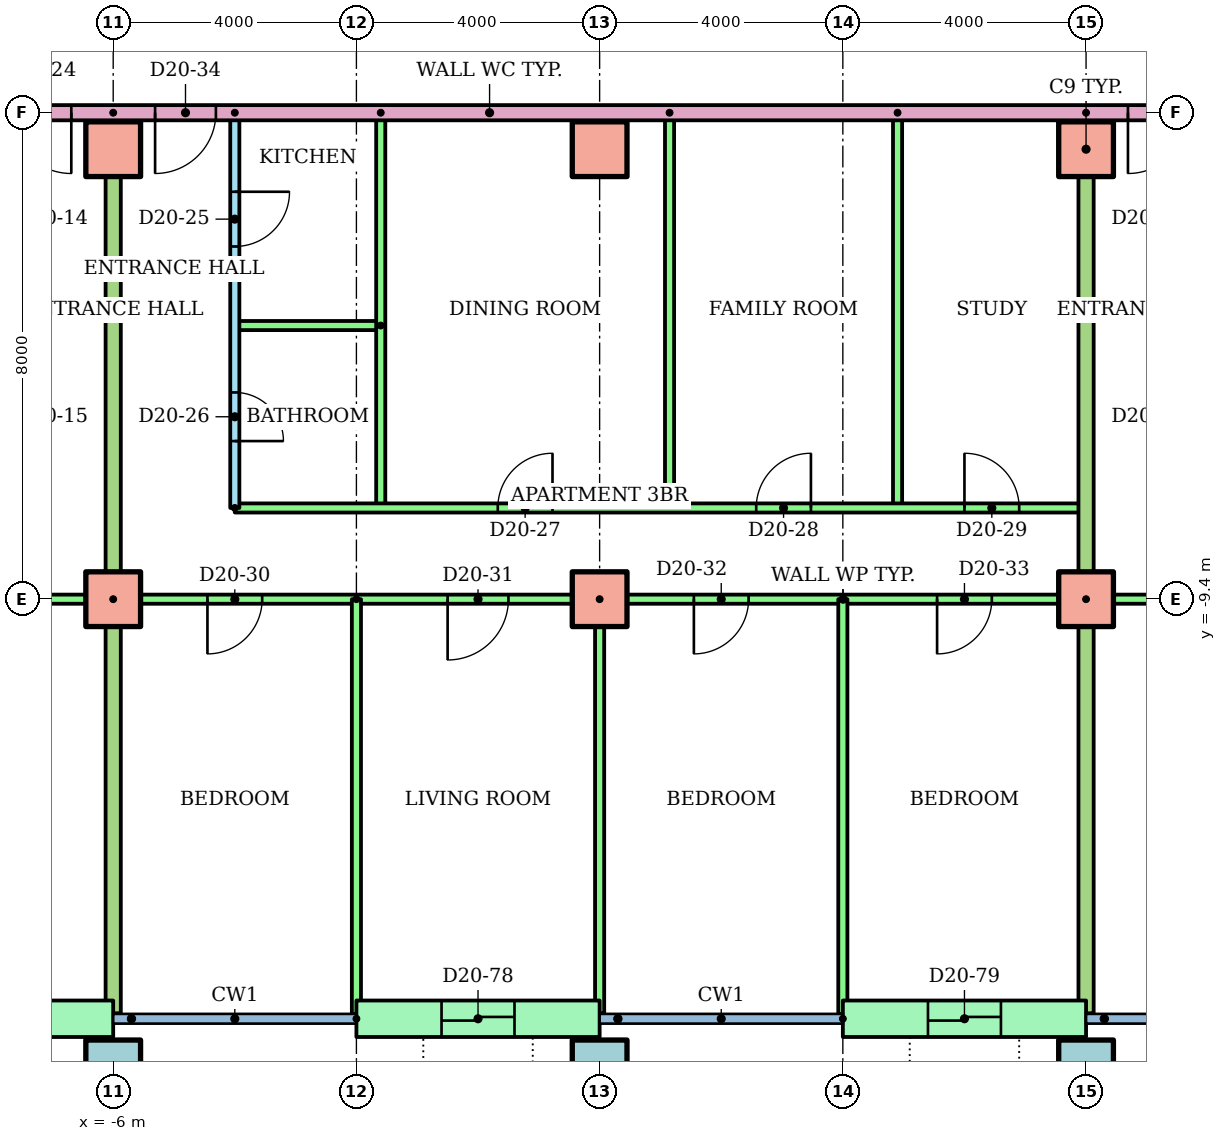
"""IFC4 building model, lengths in metres.
Left out: names, types, materials, properties, quantities, classifications, styles, units other than length and angle.
Written with IfcOpenShell. Run it as: python <this file> out.ifc"""

import sys

from ifc_helpers import new_model, si_unit, direction, frame, frame_2d, origin, origin_2d, place, context, subcontext, project, spatial, rectangle, hollow_rectangle, extrude, element, fill, save


model = new_model("IFC4")
c1 = context("Model", 3, precision=1e-05, world=origin(), true_north=direction((0.0, 1.0)))
c2 = subcontext(c1, "Body", "Model", "MODEL_VIEW")
j1 = project(units=[si_unit("LENGTHUNIT", "METRE"), si_unit("PLANEANGLEUNIT", "RADIAN")], contexts=[c1])
p1 = place(None, origin())
s1 = spatial("IfcSite", under=j1, at=p1, CompositionType="ELEMENT")
p2 = place(p1, origin())
s2 = spatial("IfcBuilding", under=s1, at=p2, CompositionType="ELEMENT")
p3 = place(p2, frame((0.0, 0.0, 80.7)))
s3 = spatial("IfcBuildingStorey", under=s2, at=p3, CompositionType="ELEMENT", Elevation=80.7)
for number, where in (
    (1, (-6.0, -17.1, 0.0)),
    (2, (2.0, -17.1, 0.0)),
    (3, (10.0, -17.1, 0.0)),
):
    element("IfcColumn", number, at=place(p3, frame(where)), inside=s3, PredefinedType="COLUMN", context=c2, shape_type="SweptSolid", body=[
        extrude(hollow_rectangle(XDim=0.9, YDim=0.9, WallThickness=0.045, at=origin_2d()), origin(), (0.0, 0.0, 1.0), 3.2),
    ])
for number, where in (
    (4, (-6.0, -9.4, 0.0)),
    (5, (2.0, -9.4, 0.0)),
    (6, (10.0, -9.4, 0.0)),
    (7, (-6.0, -2.0, 0.0)),
    (8, (2.0, -2.0, 0.0)),
    (9, (10.0, -2.0, 0.0)),
):
    element("IfcColumn", number, at=place(p3, frame(where)), inside=s3, PredefinedType="COLUMN", context=c2, shape_type="SweptSolid", body=[
        extrude(rectangle(XDim=0.9, YDim=0.9, at=origin_2d()), origin(), (0.0, 0.0, 1.0), 3.2),
    ])
p4 = place(p3, frame((-10.0, -16.3, 0.0)))
e10 = element("IfcWall", 10, at=p4, inside=s3, PredefinedType="STANDARD", context=c2, shape_type="SweptSolid", body=[
    extrude(rectangle(XDim=4.0, YDim=0.6, at=frame_2d((2.0, 0.0))), origin(), (0.0, 0.0, 1.0), 2.92),
])
p5 = place(p4, frame((1.4, 0.0, 0.0)))
e11 = element("IfcOpeningElement", 11, at=p5, cuts=e10, PredefinedType="OPENING", context=c2, shape_type="SweptSolid", body=[
    extrude(rectangle(XDim=1.2, YDim=2.1, at=frame_2d((0.6, 1.05))), frame((0.0, 0.31, 0.0), z_axis=(0.0, -1.0, 0.0), x_axis=(1.0, 0.0, 0.0)), (0.0, 0.0, 1.0), 0.62),
])
p6 = place(p3, frame((-2.0, -16.3, 0.0)))
e12 = element("IfcWall", 12, at=p6, inside=s3, PredefinedType="STANDARD", context=c2, shape_type="SweptSolid", body=[
    extrude(rectangle(XDim=4.0, YDim=0.6, at=frame_2d((2.0, 0.0))), origin(), (0.0, 0.0, 1.0), 2.92),
])
p7 = place(p6, frame((1.4, 0.0, 0.0)))
e13 = element("IfcOpeningElement", 13, at=p7, cuts=e12, PredefinedType="OPENING", context=c2, shape_type="SweptSolid", body=[
    extrude(rectangle(XDim=1.2, YDim=2.1, at=frame_2d((0.6, 1.05))), frame((0.0, 0.31, 0.0), z_axis=(0.0, -1.0, 0.0), x_axis=(1.0, 0.0, 0.0)), (0.0, 0.0, 1.0), 0.62),
])
p8 = place(p3, frame((6.0, -16.3, 0.0)))
e14 = element("IfcWall", 14, at=p8, inside=s3, PredefinedType="STANDARD", context=c2, shape_type="SweptSolid", body=[
    extrude(rectangle(XDim=4.0, YDim=0.6, at=frame_2d((2.0, 0.0))), origin(), (0.0, 0.0, 1.0), 2.92),
])
p9 = place(p8, frame((1.4, 0.0, 0.0)))
e15 = element("IfcOpeningElement", 15, at=p9, cuts=e14, PredefinedType="OPENING", context=c2, shape_type="SweptSolid", body=[
    extrude(rectangle(XDim=1.2, YDim=2.1, at=frame_2d((0.6, 1.05))), frame((0.0, 0.31, 0.0), z_axis=(0.0, -1.0, 0.0), x_axis=(1.0, 0.0, 0.0)), (0.0, 0.0, 1.0), 0.62),
])
p10 = place(p3, frame((-6.0, -9.4, 0.0), z_axis=(0.0, 0.0, 1.0), x_axis=(-1.0, 0.0, 0.0)))
e16 = element("IfcWall", 16, at=p10, inside=s3, PredefinedType="PARTITIONING", context=c2, shape_type="SweptSolid", body=[
    extrude(rectangle(XDim=22.61, YDim=0.15, at=frame_2d((11.305, 0.0))), origin(), (0.0, 0.0, 1.0), 2.4),
])
p11 = place(p10, frame((19.7, 0.0, 0.0)))
e17 = element("IfcOpeningElement", 17, at=p11, cuts=e16, PredefinedType="OPENING", context=c2, shape_type="SweptSolid", body=[
    extrude(rectangle(XDim=0.9, YDim=2.1, at=frame_2d((0.45, 1.05))), frame((0.0, 0.085, 0.0), z_axis=(0.0, -1.0, 0.0), x_axis=(1.0, 0.0, 0.0)), (0.0, 0.0, 1.0), 0.17),
])
p12 = place(p10, frame((14.411, 0.0, 0.0)))
e18 = element("IfcOpeningElement", 18, at=p12, cuts=e16, PredefinedType="OPENING", context=c2, shape_type="SweptSolid", body=[
    extrude(rectangle(XDim=0.9, YDim=2.1, at=frame_2d((0.45, 1.05))), frame((0.0, 0.085, 0.0), z_axis=(0.0, -1.0, 0.0), x_axis=(1.0, 0.0, 0.0)), (0.0, 0.0, 1.0), 0.17),
])
p13 = place(p10, frame((9.5, 0.0, 0.0)))
e19 = element("IfcOpeningElement", 19, at=p13, cuts=e16, PredefinedType="OPENING", context=c2, shape_type="SweptSolid", body=[
    extrude(rectangle(XDim=1.0, YDim=2.1, at=frame_2d((0.5, 1.05))), frame((0.0, 0.085, 0.0), z_axis=(0.0, -1.0, 0.0), x_axis=(1.0, 0.0, 0.0)), (0.0, 0.0, 1.0), 0.17),
])
p14 = place(p10, frame((5.55, 0.0, 0.0)))
e20 = element("IfcOpeningElement", 20, at=p14, cuts=e16, PredefinedType="OPENING", context=c2, shape_type="SweptSolid", body=[
    extrude(rectangle(XDim=0.9, YDim=2.1, at=frame_2d((0.45, 1.05))), frame((0.0, 0.085, 0.0), z_axis=(0.0, -1.0, 0.0), x_axis=(1.0, 0.0, 0.0)), (0.0, 0.0, 1.0), 0.17),
])
p15 = place(p10, frame((1.55, 0.0, 0.0)))
e21 = element("IfcOpeningElement", 21, at=p15, cuts=e16, PredefinedType="OPENING", context=c2, shape_type="SweptSolid", body=[
    extrude(rectangle(XDim=0.9, YDim=2.1, at=frame_2d((0.45, 1.05))), frame((0.0, 0.085, 0.0), z_axis=(0.0, -1.0, 0.0), x_axis=(1.0, 0.0, 0.0)), (0.0, 0.0, 1.0), 0.17),
])
p16 = place(p3, frame((-4.0, -1.4, 0.0), z_axis=(0.0, 0.0, 1.0), x_axis=(0.0, -1.0, 0.0)))
e22 = element("IfcWall", 22, at=p16, inside=s3, PredefinedType="PARTITIONING", context=c2, shape_type="SweptSolid", body=[
    extrude(rectangle(XDim=6.5, YDim=0.15, at=frame_2d((3.25, 0.0))), origin(), (0.0, 0.0, 1.0), 2.4),
])
p17 = place(p16, frame((1.3, 0.0, 0.0)))
e23 = element("IfcOpeningElement", 23, at=p17, cuts=e22, PredefinedType="OPENING", context=c2, shape_type="SweptSolid", body=[
    extrude(rectangle(XDim=0.9, YDim=2.1, at=frame_2d((0.45, 1.05))), frame((0.0, 0.085, 0.0), z_axis=(0.0, -1.0, 0.0), x_axis=(1.0, 0.0, 0.0)), (0.0, 0.0, 1.0), 0.17),
])
p18 = place(p16, frame((4.6, 0.0, 0.0)))
e24 = element("IfcOpeningElement", 24, at=p18, cuts=e22, PredefinedType="OPENING", context=c2, shape_type="SweptSolid", body=[
    extrude(rectangle(XDim=0.8, YDim=2.1, at=frame_2d((0.4, 1.05))), frame((0.0, 0.085, 0.0), z_axis=(0.0, -1.0, 0.0), x_axis=(1.0, 0.0, 0.0)), (0.0, 0.0, 1.0), 0.17),
])
p19 = place(p3, frame((-1.6, -4.9, 0.0), z_axis=(0.0, 0.0, 1.0), x_axis=(-1.0, 0.0, 0.0)))
e25 = element("IfcWall", 25, at=p19, inside=s3, PredefinedType="PARTITIONING", context=c2, shape_type="SweptSolid", body=[
    extrude(rectangle(XDim=2.4, YDim=0.15, at=frame_2d((1.2, 0.0))), origin(), (0.0, 0.0, 1.0), 2.4),
])
for number, where, z_axis, x_axis in (
    (26, (-1.6, -1.4, 0.0), (0.0, 0.0, 1.0), (0.0, -1.0, 0.0)),
    (27, (3.15, -1.4, 0.0), (0.0, 0.0, 1.0), (0.0, -1.0, 0.0)),
    (28, (6.9, -1.4, 0.0), (0.0, 0.0, 1.0), (0.0, -1.0, 0.0)),
):
    element("IfcWall", number, at=place(p3, frame(where, z_axis=z_axis, x_axis=x_axis)), inside=s3, PredefinedType="PARTITIONING", context=c2, shape_type="SweptSolid", body=[
        extrude(rectangle(XDim=6.5, YDim=0.15, at=frame_2d((3.25, 0.0))), origin(), (0.0, 0.0, 1.0), 2.4),
    ])
p20 = place(p3, frame((-4.0, -7.9, 0.0)))
e29 = element("IfcWall", 29, at=p20, inside=s3, PredefinedType="PARTITIONING", context=c2, shape_type="SweptSolid", body=[
    extrude(rectangle(XDim=14.0, YDim=0.15, at=frame_2d((7.0, 0.0))), origin(), (0.0, 0.0, 1.0), 2.4),
])
p21 = place(p20, frame((4.325, 0.0, 0.0)))
e30 = element("IfcOpeningElement", 30, at=p21, cuts=e29, PredefinedType="OPENING", context=c2, shape_type="SweptSolid", body=[
    extrude(rectangle(XDim=0.9, YDim=2.1, at=frame_2d((0.45, 1.05))), frame((0.0, 0.085, 0.0), z_axis=(0.0, -1.0, 0.0), x_axis=(1.0, 0.0, 0.0)), (0.0, 0.0, 1.0), 0.17),
])
p22 = place(p20, frame((8.575, 0.0, 0.0)))
e31 = element("IfcOpeningElement", 31, at=p22, cuts=e29, PredefinedType="OPENING", context=c2, shape_type="SweptSolid", body=[
    extrude(rectangle(XDim=0.9, YDim=2.1, at=frame_2d((0.45, 1.05))), frame((0.0, 0.085, 0.0), z_axis=(0.0, -1.0, 0.0), x_axis=(1.0, 0.0, 0.0)), (0.0, 0.0, 1.0), 0.17),
])
p23 = place(p20, frame((12.0, 0.0, 0.0)))
e32 = element("IfcOpeningElement", 32, at=p23, cuts=e29, PredefinedType="OPENING", context=c2, shape_type="SweptSolid", body=[
    extrude(rectangle(XDim=0.9, YDim=2.1, at=frame_2d((0.45, 1.05))), frame((0.0, 0.085, 0.0), z_axis=(0.0, -1.0, 0.0), x_axis=(1.0, 0.0, 0.0)), (0.0, 0.0, 1.0), 0.17),
])
p24 = place(p3, frame((10.0, -9.4, 0.0), z_axis=(0.0, 0.0, 1.0), x_axis=(-1.0, 0.0, 0.0)))
e33 = element("IfcWall", 33, at=p24, inside=s3, PredefinedType="PARTITIONING", context=c2, shape_type="SweptSolid", body=[
    extrude(rectangle(XDim=16.0, YDim=0.15, at=frame_2d((8.0, 0.0))), origin(), (0.0, 0.0, 1.0), 2.4),
])
p25 = place(p24, frame((13.55, 0.0, 0.0)))
e34 = element("IfcOpeningElement", 34, at=p25, cuts=e33, PredefinedType="OPENING", context=c2, shape_type="SweptSolid", body=[
    extrude(rectangle(XDim=0.9, YDim=2.1, at=frame_2d((0.45, 1.05))), frame((0.0, 0.085, 0.0), z_axis=(0.0, -1.0, 0.0), x_axis=(1.0, 0.0, 0.0)), (0.0, 0.0, 1.0), 0.17),
])
p26 = place(p24, frame((9.5, 0.0, 0.0)))
e35 = element("IfcOpeningElement", 35, at=p26, cuts=e33, PredefinedType="OPENING", context=c2, shape_type="SweptSolid", body=[
    extrude(rectangle(XDim=1.0, YDim=2.1, at=frame_2d((0.5, 1.05))), frame((0.0, 0.085, 0.0), z_axis=(0.0, -1.0, 0.0), x_axis=(1.0, 0.0, 0.0)), (0.0, 0.0, 1.0), 0.17),
])
p27 = place(p24, frame((5.55, 0.0, 0.0)))
e36 = element("IfcOpeningElement", 36, at=p27, cuts=e33, PredefinedType="OPENING", context=c2, shape_type="SweptSolid", body=[
    extrude(rectangle(XDim=0.9, YDim=2.1, at=frame_2d((0.45, 1.05))), frame((0.0, 0.085, 0.0), z_axis=(0.0, -1.0, 0.0), x_axis=(1.0, 0.0, 0.0)), (0.0, 0.0, 1.0), 0.17),
])
p28 = place(p24, frame((1.55, 0.0, 0.0)))
e37 = element("IfcOpeningElement", 37, at=p28, cuts=e33, PredefinedType="OPENING", context=c2, shape_type="SweptSolid", body=[
    extrude(rectangle(XDim=0.9, YDim=2.1, at=frame_2d((0.45, 1.05))), frame((0.0, 0.085, 0.0), z_axis=(0.0, -1.0, 0.0), x_axis=(1.0, 0.0, 0.0)), (0.0, 0.0, 1.0), 0.17),
])
p29 = place(p3, frame((-2.0, -9.4, 0.0), z_axis=(0.0, 0.0, 1.0), x_axis=(0.0, -1.0, 0.0)))
e38 = element("IfcWall", 38, at=p29, inside=s3, PredefinedType="PARTITIONING", context=c2, shape_type="SweptSolid", body=[
    extrude(rectangle(XDim=6.821, YDim=0.15, at=frame_2d((3.411, 0.0))), origin(), (0.0, 0.0, 1.0), 2.4),
])
p30 = place(p3, frame((2.0, -9.4, 0.0), z_axis=(0.0, 0.0, 1.0), x_axis=(0.0, -1.0, 0.0)))
e39 = element("IfcWall", 39, at=p30, inside=s3, PredefinedType="PARTITIONING", context=c2, shape_type="SweptSolid", body=[
    extrude(rectangle(XDim=6.81, YDim=0.15, at=frame_2d((3.405, 0.0))), origin(), (0.0, 0.0, 1.0), 2.4),
])
p31 = place(p3, frame((6.0, -9.4, 0.0), z_axis=(0.0, 0.0, 1.0), x_axis=(0.0, -1.0, 0.0)))
e40 = element("IfcWall", 40, at=p31, inside=s3, PredefinedType="PARTITIONING", context=c2, shape_type="SweptSolid", body=[
    extrude(rectangle(XDim=6.821, YDim=0.15, at=frame_2d((3.411, 0.0))), origin(), (0.0, 0.0, 1.0), 2.4),
])
p32 = place(p3, frame((-6.0, -1.4, 0.0), z_axis=(0.0, 0.0, 1.0), x_axis=(0.0, -1.0, 0.0)))
e41 = element("IfcWall", 41, at=p32, inside=s3, PredefinedType="PARTITIONING", context=c2, shape_type="SweptSolid", body=[
    extrude(rectangle(XDim=14.81, YDim=0.25, at=frame_2d((7.405, 0.0))), origin(), (0.0, 0.0, 1.0), 2.4),
])
p33 = place(p3, frame((26.0, -9.4, 0.0), z_axis=(0.0, 0.0, 1.0), x_axis=(-1.0, 0.0, 0.0)))
e42 = element("IfcWall", 42, at=p33, inside=s3, PredefinedType="PARTITIONING", context=c2, shape_type="SweptSolid", body=[
    extrude(rectangle(XDim=16.0, YDim=0.15, at=frame_2d((8.0, 0.0))), origin(), (0.0, 0.0, 1.0), 2.4),
])
p34 = place(p33, frame((13.55, 0.0, 0.0)))
e43 = element("IfcOpeningElement", 43, at=p34, cuts=e42, PredefinedType="OPENING", context=c2, shape_type="SweptSolid", body=[
    extrude(rectangle(XDim=0.9, YDim=2.1, at=frame_2d((0.45, 1.05))), frame((0.0, 0.085, 0.0), z_axis=(0.0, -1.0, 0.0), x_axis=(1.0, 0.0, 0.0)), (0.0, 0.0, 1.0), 0.17),
])
p35 = place(p33, frame((9.55, 0.0, 0.0)))
e44 = element("IfcOpeningElement", 44, at=p35, cuts=e42, PredefinedType="OPENING", context=c2, shape_type="SweptSolid", body=[
    extrude(rectangle(XDim=0.9, YDim=2.1, at=frame_2d((0.45, 1.05))), frame((0.0, 0.085, 0.0), z_axis=(0.0, -1.0, 0.0), x_axis=(1.0, 0.0, 0.0)), (0.0, 0.0, 1.0), 0.17),
])
p36 = place(p33, frame((3.5, 0.0, 0.0)))
e45 = element("IfcOpeningElement", 45, at=p36, cuts=e42, PredefinedType="OPENING", context=c2, shape_type="SweptSolid", body=[
    extrude(rectangle(XDim=1.0, YDim=2.1, at=frame_2d((0.5, 1.05))), frame((0.0, 0.085, 0.0), z_axis=(0.0, -1.0, 0.0), x_axis=(1.0, 0.0, 0.0)), (0.0, 0.0, 1.0), 0.17),
])
p37 = place(p3, frame((10.0, -1.4, 0.0), z_axis=(0.0, 0.0, 1.0), x_axis=(0.0, -1.0, 0.0)))
e46 = element("IfcWall", 46, at=p37, inside=s3, PredefinedType="PARTITIONING", context=c2, shape_type="SweptSolid", body=[
    extrude(rectangle(XDim=14.81, YDim=0.25, at=frame_2d((7.405, 0.0))), origin(), (0.0, 0.0, 1.0), 2.4),
])
p38 = place(p3, frame((14.0, -1.4, 0.0), z_axis=(0.0, 0.0, 1.0), x_axis=(-1.0, 0.0, 0.0)))
e47 = element("IfcWall", 47, at=p38, inside=s3, PredefinedType="PARTITIONING", context=c2, shape_type="SweptSolid", body=[
    extrude(rectangle(XDim=28.0, YDim=0.25, at=frame_2d((14.0, 0.0))), origin(), (0.0, 0.0, 1.0), 2.4),
])
p39 = place(p38, frame((20.689, 0.0, 0.0)))
e48 = element("IfcOpeningElement", 48, at=p39, cuts=e47, PredefinedType="OPENING", context=c2, shape_type="SweptSolid", body=[
    extrude(rectangle(XDim=1.0, YDim=2.1, at=frame_2d((0.5, 1.05))), frame((0.0, 0.135, 0.0), z_axis=(0.0, -1.0, 0.0), x_axis=(1.0, 0.0, 0.0)), (0.0, 0.0, 1.0), 0.27),
])
p40 = place(p38, frame((18.311, 0.0, 0.0)))
e49 = element("IfcOpeningElement", 49, at=p40, cuts=e47, PredefinedType="OPENING", context=c2, shape_type="SweptSolid", body=[
    extrude(rectangle(XDim=1.0, YDim=2.1, at=frame_2d((0.5, 1.05))), frame((0.0, 0.135, 0.0), z_axis=(0.0, -1.0, 0.0), x_axis=(1.0, 0.0, 0.0)), (0.0, 0.0, 1.0), 0.27),
])
p41 = place(p38, frame((2.311, 0.0, 0.0)))
e50 = element("IfcOpeningElement", 50, at=p41, cuts=e47, PredefinedType="OPENING", context=c2, shape_type="SweptSolid", body=[
    extrude(rectangle(XDim=1.0, YDim=2.1, at=frame_2d((0.5, 1.05))), frame((0.0, 0.135, 0.0), z_axis=(0.0, -1.0, 0.0), x_axis=(1.0, 0.0, 0.0)), (0.0, 0.0, 1.0), 0.27),
])
p42 = place(p39, origin())
e51 = element("IfcDoor", 51, at=p42, inside=s3, OperationType="SINGLE_SWING_LEFT", PredefinedType="DOOR", context=c2, shape_type="SweptSolid", body=[
    extrude(rectangle(XDim=1.0, YDim=2.1, at=frame_2d((0.5, 1.05))), frame((0.0, 0.025, 0.0), z_axis=(0.0, -1.0, 0.0), x_axis=(1.0, 0.0, 0.0)), (0.0, 0.0, 1.0), 0.05),
])
fill(e48, e51)
p43 = place(p17, origin())
e52 = element("IfcDoor", 52, at=p43, inside=s3, OperationType="SINGLE_SWING_LEFT", PredefinedType="DOOR", context=c2, shape_type="SweptSolid", body=[
    extrude(rectangle(XDim=0.9, YDim=2.1, at=frame_2d((0.45, 1.05))), frame((0.0, 0.025, 0.0), z_axis=(0.0, -1.0, 0.0), x_axis=(1.0, 0.0, 0.0)), (0.0, 0.0, 1.0), 0.05),
])
fill(e23, e52)
p44 = place(p18, origin())
e53 = element("IfcDoor", 53, at=p44, inside=s3, OperationType="SINGLE_SWING_RIGHT", PredefinedType="DOOR", context=c2, shape_type="SweptSolid", body=[
    extrude(rectangle(XDim=0.8, YDim=2.1, at=frame_2d((0.4, 1.05))), frame((0.0, 0.025, 0.0), z_axis=(0.0, -1.0, 0.0), x_axis=(1.0, 0.0, 0.0)), (0.0, 0.0, 1.0), 0.05),
])
fill(e24, e53)
p45 = place(p21, origin())
e54 = element("IfcDoor", 54, at=p45, inside=s3, OperationType="SINGLE_SWING_RIGHT", PredefinedType="DOOR", context=c2, shape_type="SweptSolid", body=[
    extrude(rectangle(XDim=0.9, YDim=2.1, at=frame_2d((0.45, 1.05))), frame((0.0, 0.025, 0.0), z_axis=(0.0, -1.0, 0.0), x_axis=(1.0, 0.0, 0.0)), (0.0, 0.0, 1.0), 0.05),
])
fill(e30, e54)
p46 = place(p22, origin())
e55 = element("IfcDoor", 55, at=p46, inside=s3, OperationType="SINGLE_SWING_RIGHT", PredefinedType="DOOR", context=c2, shape_type="SweptSolid", body=[
    extrude(rectangle(XDim=0.9, YDim=2.1, at=frame_2d((0.45, 1.05))), frame((0.0, 0.025, 0.0), z_axis=(0.0, -1.0, 0.0), x_axis=(1.0, 0.0, 0.0)), (0.0, 0.0, 1.0), 0.05),
])
fill(e31, e55)
p47 = place(p23, origin())
e56 = element("IfcDoor", 56, at=p47, inside=s3, OperationType="SINGLE_SWING_LEFT", PredefinedType="DOOR", context=c2, shape_type="SweptSolid", body=[
    extrude(rectangle(XDim=0.9, YDim=2.1, at=frame_2d((0.45, 1.05))), frame((0.0, 0.025, 0.0), z_axis=(0.0, -1.0, 0.0), x_axis=(1.0, 0.0, 0.0)), (0.0, 0.0, 1.0), 0.05),
])
fill(e32, e56)
p48 = place(p25, origin())
e57 = element("IfcDoor", 57, at=p48, inside=s3, OperationType="SINGLE_SWING_RIGHT", PredefinedType="DOOR", context=c2, shape_type="SweptSolid", body=[
    extrude(rectangle(XDim=0.9, YDim=2.1, at=frame_2d((0.45, 1.05))), frame((0.0, 0.025, 0.0), z_axis=(0.0, -1.0, 0.0), x_axis=(1.0, 0.0, 0.0)), (0.0, 0.0, 1.0), 0.05),
])
fill(e34, e57)
p49 = place(p26, origin())
e58 = element("IfcDoor", 58, at=p49, inside=s3, OperationType="SINGLE_SWING_RIGHT", PredefinedType="DOOR", context=c2, shape_type="SweptSolid", body=[
    extrude(rectangle(XDim=1.0, YDim=2.1, at=frame_2d((0.5, 1.05))), frame((0.0, 0.025, 0.0), z_axis=(0.0, -1.0, 0.0), x_axis=(1.0, 0.0, 0.0)), (0.0, 0.0, 1.0), 0.05),
])
fill(e35, e58)
p50 = place(p27, origin())
e59 = element("IfcDoor", 59, at=p50, inside=s3, OperationType="SINGLE_SWING_RIGHT", PredefinedType="DOOR", context=c2, shape_type="SweptSolid", body=[
    extrude(rectangle(XDim=0.9, YDim=2.1, at=frame_2d((0.45, 1.05))), frame((0.0, 0.025, 0.0), z_axis=(0.0, -1.0, 0.0), x_axis=(1.0, 0.0, 0.0)), (0.0, 0.0, 1.0), 0.05),
])
fill(e36, e59)
p51 = place(p28, origin())
e60 = element("IfcDoor", 60, at=p51, inside=s3, OperationType="SINGLE_SWING_RIGHT", PredefinedType="DOOR", context=c2, shape_type="SweptSolid", body=[
    extrude(rectangle(XDim=0.9, YDim=2.1, at=frame_2d((0.45, 1.05))), frame((0.0, 0.025, 0.0), z_axis=(0.0, -1.0, 0.0), x_axis=(1.0, 0.0, 0.0)), (0.0, 0.0, 1.0), 0.05),
])
fill(e37, e60)
p52 = place(p40, origin())
e61 = element("IfcDoor", 61, at=p52, inside=s3, OperationType="SINGLE_SWING_RIGHT", PredefinedType="DOOR", context=c2, shape_type="SweptSolid", body=[
    extrude(rectangle(XDim=1.0, YDim=2.1, at=frame_2d((0.5, 1.05))), frame((0.0, 0.025, 0.0), z_axis=(0.0, -1.0, 0.0), x_axis=(1.0, 0.0, 0.0)), (0.0, 0.0, 1.0), 0.05),
])
fill(e49, e61)
p53 = place(p41, origin())
e62 = element("IfcDoor", 62, at=p53, inside=s3, OperationType="SINGLE_SWING_RIGHT", PredefinedType="DOOR", context=c2, shape_type="SweptSolid", body=[
    extrude(rectangle(XDim=1.0, YDim=2.1, at=frame_2d((0.5, 1.05))), frame((0.0, 0.025, 0.0), z_axis=(0.0, -1.0, 0.0), x_axis=(1.0, 0.0, 0.0)), (0.0, 0.0, 1.0), 0.05),
])
fill(e50, e62)
p54 = place(p7, origin())
e63 = element("IfcDoor", 63, at=p54, inside=s3, OperationType="SLIDING_TO_LEFT", PredefinedType="DOOR", context=c2, shape_type="SweptSolid", body=[
    extrude(rectangle(XDim=1.2, YDim=2.1, at=frame_2d((0.6, 1.05))), frame((0.0, 0.025, 0.0), z_axis=(0.0, -1.0, 0.0), x_axis=(1.0, 0.0, 0.0)), (0.0, 0.0, 1.0), 0.05),
])
fill(e13, e63)
p55 = place(p9, origin())
e64 = element("IfcDoor", 64, at=p55, inside=s3, OperationType="SLIDING_TO_LEFT", PredefinedType="DOOR", context=c2, shape_type="SweptSolid", body=[
    extrude(rectangle(XDim=1.2, YDim=2.1, at=frame_2d((0.6, 1.05))), frame((0.0, 0.025, 0.0), z_axis=(0.0, -1.0, 0.0), x_axis=(1.0, 0.0, 0.0)), (0.0, 0.0, 1.0), 0.05),
])
fill(e15, e64)
save(model, sys.argv[1])
